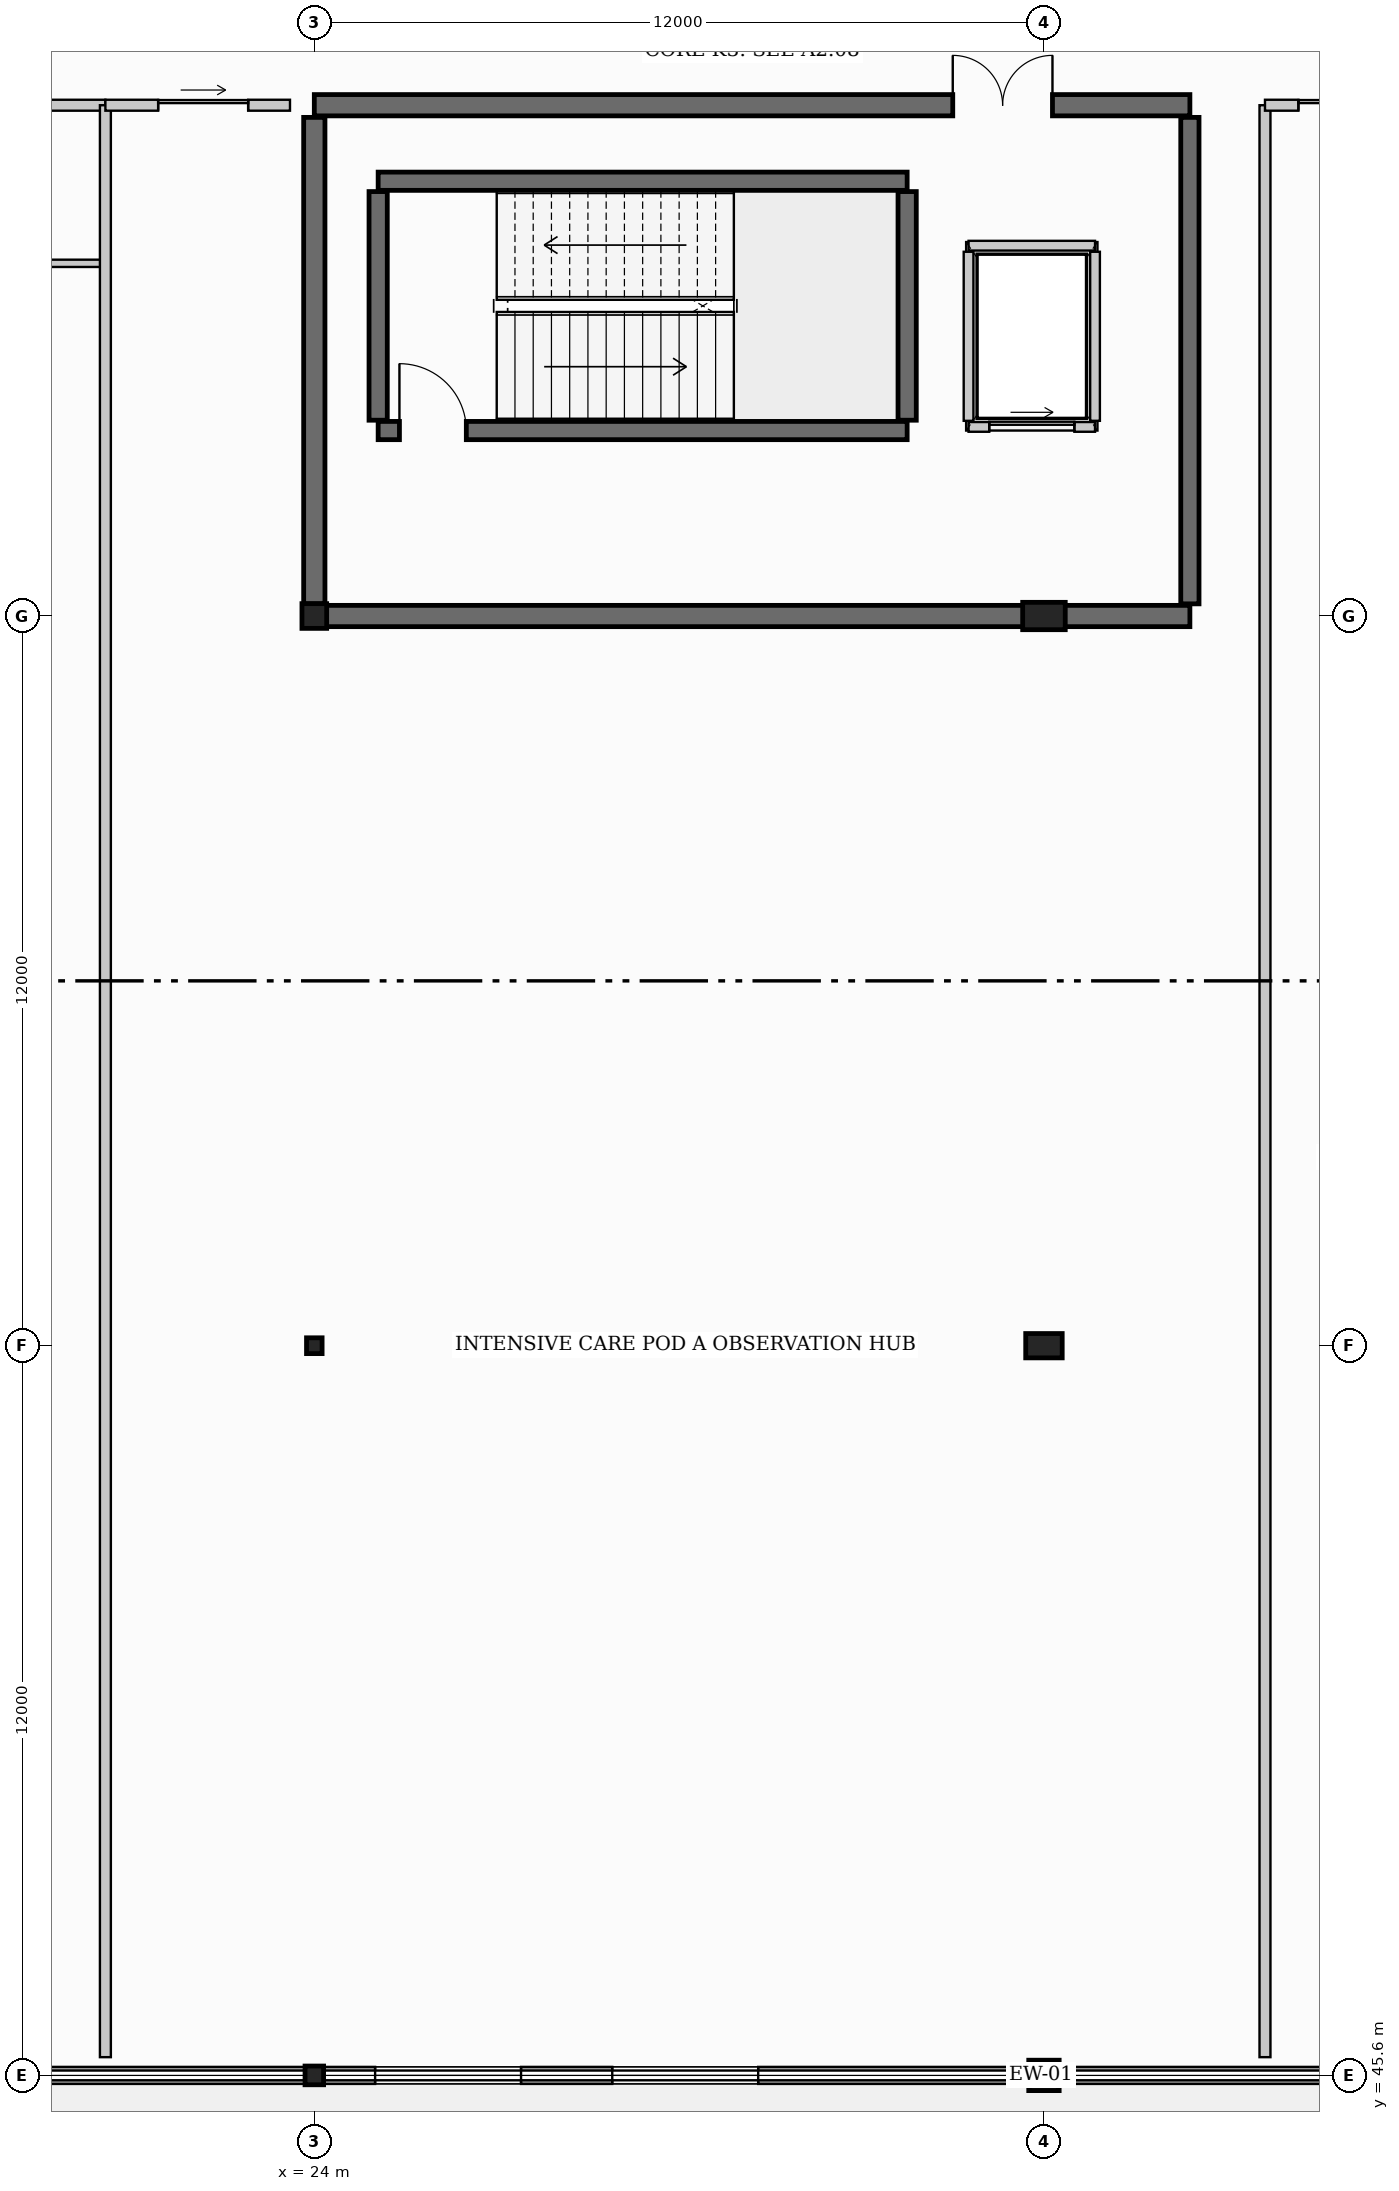
"""IFC4 building model, lengths in metres.
Left out: names, types, materials, properties, quantities, classifications, styles, units other than length and angle.
Written with IfcOpenShell. Run it as: python <this file> out.ifc"""

import sys

from ifc_helpers import new_model, si_unit, direction, frame, frame_2d, origin, origin_2d, place, context, subcontext, project, spatial, rectangle, hollow_circle, i_section, extrude, element, fill, save


model = new_model("IFC4")
c1 = context("Model", 3, precision=1e-05, world=origin(), true_north=direction((0.0, 1.0)))
c2 = subcontext(c1, "Body", "Model", "MODEL_VIEW")
j1 = project(units=[si_unit("LENGTHUNIT", "METRE"), si_unit("PLANEANGLEUNIT", "RADIAN")], contexts=[c1])
p1 = place(None, origin())
s1 = spatial("IfcSite", under=j1, at=p1, CompositionType="ELEMENT")
p2 = place(p1, origin())
s2 = spatial("IfcBuilding", under=s1, at=p2, CompositionType="ELEMENT")
p3 = place(p2, frame((0.0, 0.0, 4.8)))
s3 = spatial("IfcBuildingStorey", under=s2, at=p3, CompositionType="ELEMENT", Elevation=4.8)
p4 = place(p3, frame((24.0, 45.6, 0.0), z_axis=(0.0, 0.0, 1.0), x_axis=(1.0, 0.0, 0.0)))
e1 = element("IfcColumn", 1, at=p4, inside=s3, PredefinedType="COLUMN", context=c2, shape_type="SweptSolid", body=[
    extrude(i_section(OverallWidth=0.305, OverallDepth=0.308, WebThickness=0.01, FlangeThickness=0.015, at=origin_2d()), origin(), (0.0, 0.0, 1.0), 4.8),
])
p5 = place(p3, frame((24.0, 57.6, 0.0), z_axis=(0.0, 0.0, 1.0), x_axis=(1.0, 0.0, 0.0)))
e2 = element("IfcColumn", 2, at=p5, inside=s3, PredefinedType="COLUMN", context=c2, shape_type="SweptSolid", body=[
    extrude(i_section(OverallWidth=0.256, OverallDepth=0.26, WebThickness=0.01, FlangeThickness=0.017, at=origin_2d()), origin(), (0.0, 0.0, 1.0), 4.8),
])
p6 = place(p3, frame((24.0, 69.6, 0.0), z_axis=(0.0, 0.0, 1.0), x_axis=(1.0, 0.0, 0.0)))
e3 = element("IfcColumn", 3, at=p6, inside=s3, PredefinedType="COLUMN", context=c2, shape_type="SweptSolid", body=[
    extrude(hollow_circle(Radius=0.203, WallThickness=0.016, at=origin_2d()), origin(), (0.0, 0.0, 1.0), 4.8),
])
p7 = place(p3, frame((36.0, 45.6, 0.0), z_axis=(0.0, 0.0, 1.0), x_axis=(0.0, 1.0, 0.0)))
e4 = element("IfcColumn", 4, at=p7, inside=s3, PredefinedType="COLUMN", context=c2, shape_type="SweptSolid", body=[
    extrude(rectangle(XDim=0.5, YDim=0.5, at=origin_2d()), origin(), (0.0, 0.0, 1.0), 4.8),
])
p8 = place(p3, frame((36.0, 57.6, 0.0), z_axis=(0.0, 0.0, 1.0), x_axis=(0.0, 1.0, 0.0)))
e5 = element("IfcColumn", 5, at=p8, inside=s3, PredefinedType="PILASTER", context=c2, shape_type="SweptSolid", body=[
    extrude(rectangle(XDim=0.4, YDim=0.6, at=origin_2d()), origin(), (0.0, 0.0, 1.0), 4.8),
])
p9 = place(p3, frame((36.0, 69.6, 0.0), z_axis=(0.0, 0.0, 1.0), x_axis=(0.0, 1.0, 0.0)))
e6 = element("IfcColumn", 6, at=p9, inside=s3, PredefinedType="PILASTER", context=c2, shape_type="SweptSolid", body=[
    extrude(rectangle(XDim=0.45, YDim=0.7, at=origin_2d()), origin(), (0.0, 0.0, 1.0), 4.8),
])
p10 = place(p3, frame((24.0, 78.0, 0.0), z_axis=(0.0, 0.0, 1.0), x_axis=(1.0, 0.0, 0.0)))
e7 = element("IfcWall", 7, at=p10, inside=s3, PredefinedType="SHEAR", context=c2, shape_type="SweptSolid", body=[
    extrude(rectangle(XDim=14.4, YDim=0.35, at=frame_2d((7.2, 0.0))), origin(), (0.0, 0.0, 1.0), 4.8),
])
p11 = place(p10, frame((10.5, 0.0, 0.0)))
e8 = element("IfcOpeningElement", 8, at=p11, cuts=e7, PredefinedType="OPENING", context=c2, shape_type="SweptSolid", body=[
    extrude(rectangle(XDim=1.64, YDim=2.2, at=frame_2d((0.82, 1.1))), frame((0.0, 0.185, 0.0), z_axis=(0.0, -1.0, 0.0), x_axis=(1.0, 0.0, 0.0)), (0.0, 0.0, 1.0), 0.37),
])
p12 = place(p3, frame((38.4, 69.6, 0.0), z_axis=(0.0, 0.0, 1.0), x_axis=(-1.0, 0.0, 0.0)))
e9 = element("IfcWall", 9, at=p12, inside=s3, PredefinedType="SHEAR", context=c2, shape_type="SweptSolid", body=[
    extrude(rectangle(XDim=14.4, YDim=0.35, at=frame_2d((7.2, 0.0))), origin(), (0.0, 0.0, 1.0), 4.8),
])
p13 = place(p3, frame((24.0, 69.8, 0.0), z_axis=(0.0, 0.0, 1.0), x_axis=(0.0, 1.0, 0.0)))
e10 = element("IfcWall", 10, at=p13, inside=s3, PredefinedType="SHEAR", context=c2, shape_type="SweptSolid", body=[
    extrude(rectangle(XDim=8.0, YDim=0.35, at=frame_2d((4.0, 0.0))), origin(), (0.0, 0.0, 1.0), 4.8),
])
p14 = place(p3, frame((38.4, 77.8, 0.0), z_axis=(0.0, 0.0, 1.0), x_axis=(0.0, -1.0, 0.0)))
e11 = element("IfcWall", 11, at=p14, inside=s3, PredefinedType="SHEAR", context=c2, shape_type="SweptSolid", body=[
    extrude(rectangle(XDim=8.0, YDim=0.3, at=frame_2d((4.0, 0.0))), origin(), (0.0, 0.0, 1.0), 4.8),
])
p15 = place(p3, frame((25.05, 72.65, 0.0), z_axis=(0.0, 0.0, 1.0), x_axis=(1.0, 0.0, 0.0)))
e12 = element("IfcWall", 12, at=p15, inside=s3, PredefinedType="SHEAR", context=c2, shape_type="SweptSolid", body=[
    extrude(rectangle(XDim=8.7, YDim=0.3, at=frame_2d((4.35, 0.0))), origin(), (0.0, 0.0, 1.0), 4.8),
])
p16 = place(p15, frame((0.35, 0.0, 0.0)))
e13 = element("IfcOpeningElement", 13, at=p16, cuts=e12, PredefinedType="OPENING", context=c2, shape_type="SweptSolid", body=[
    extrude(rectangle(XDim=1.1, YDim=2.15, at=frame_2d((0.55, 1.075))), frame((0.0, 0.16, 0.0), z_axis=(0.0, -1.0, 0.0), x_axis=(1.0, 0.0, 0.0)), (0.0, 0.0, 1.0), 0.32),
])
p17 = place(p3, frame((33.75, 76.75, 0.0), z_axis=(0.0, 0.0, 1.0), x_axis=(-1.0, 0.0, 0.0)))
e14 = element("IfcWall", 14, at=p17, inside=s3, PredefinedType="SHEAR", context=c2, shape_type="SweptSolid", body=[
    extrude(rectangle(XDim=8.7, YDim=0.3, at=frame_2d((4.35, 0.0))), origin(), (0.0, 0.0, 1.0), 4.8),
])
for number, where, z_axis, x_axis in (
    (15, (25.05, 72.82, 0.0), (0.0, 0.0, 1.0), (0.0, 1.0, 0.0)),
    (16, (33.75, 72.82, 0.0), (0.0, 0.0, 1.0), (0.0, 1.0, 0.0)),
):
    element("IfcWall", number, at=place(p3, frame(where, z_axis=z_axis, x_axis=x_axis)), inside=s3, PredefinedType="SHEAR", context=c2, shape_type="SweptSolid", body=[
        extrude(rectangle(XDim=3.76, YDim=0.3, at=frame_2d((1.88, 0.0))), origin(), (0.0, 0.0, 1.0), 4.8),
    ])
p18 = place(p3, frame((48.0, 45.6, 0.0), z_axis=(0.0, 0.0, 1.0), x_axis=(-1.0, 0.0, 0.0)))
e17 = element("IfcWall", 17, at=p18, inside=s3, PredefinedType="STANDARD", context=c2, shape_type="SweptSolid", body=[
    extrude(rectangle(XDim=48.0, YDim=0.28, at=frame_2d((24.0, 0.0))), origin(), (0.0, 0.0, 1.0), 3.465),
])
p19 = place(p18, frame((1.1, 0.0, 0.95)))
e18 = element("IfcOpeningElement", 18, at=p19, cuts=e17, PredefinedType="OPENING", context=c2, shape_type="SweptSolid", body=[
    extrude(rectangle(XDim=2.4, YDim=1.5, at=frame_2d((1.2, 0.75))), frame((0.0, 0.15, 0.0), z_axis=(0.0, -1.0, 0.0), x_axis=(1.0, 0.0, 0.0)), (0.0, 0.0, 1.0), 0.3),
])
p20 = place(p18, frame((5.0, 0.0, 0.95)))
e19 = element("IfcOpeningElement", 19, at=p20, cuts=e17, PredefinedType="OPENING", context=c2, shape_type="SweptSolid", body=[
    extrude(rectangle(XDim=2.4, YDim=1.5, at=frame_2d((1.2, 0.75))), frame((0.0, 0.15, 0.0), z_axis=(0.0, -1.0, 0.0), x_axis=(1.0, 0.0, 0.0)), (0.0, 0.0, 1.0), 0.3),
])
p21 = place(p18, frame((16.7, 0.0, 0.95)))
e20 = element("IfcOpeningElement", 20, at=p21, cuts=e17, PredefinedType="OPENING", context=c2, shape_type="SweptSolid", body=[
    extrude(rectangle(XDim=2.4, YDim=1.5, at=frame_2d((1.2, 0.75))), frame((0.0, 0.15, 0.0), z_axis=(0.0, -1.0, 0.0), x_axis=(1.0, 0.0, 0.0)), (0.0, 0.0, 1.0), 0.3),
])
p22 = place(p18, frame((20.6, 0.0, 0.95)))
e21 = element("IfcOpeningElement", 21, at=p22, cuts=e17, PredefinedType="OPENING", context=c2, shape_type="SweptSolid", body=[
    extrude(rectangle(XDim=2.4, YDim=1.5, at=frame_2d((1.2, 0.75))), frame((0.0, 0.15, 0.0), z_axis=(0.0, -1.0, 0.0), x_axis=(1.0, 0.0, 0.0)), (0.0, 0.0, 1.0), 0.3),
])
p23 = place(p18, frame((28.4, 0.0, 0.95)))
e22 = element("IfcOpeningElement", 22, at=p23, cuts=e17, PredefinedType="OPENING", context=c2, shape_type="SweptSolid", body=[
    extrude(rectangle(XDim=2.4, YDim=1.5, at=frame_2d((1.2, 0.75))), frame((0.0, 0.15, 0.0), z_axis=(0.0, -1.0, 0.0), x_axis=(1.0, 0.0, 0.0)), (0.0, 0.0, 1.0), 0.3),
])
p24 = place(p18, frame((32.3, 0.0, 0.95)))
e23 = element("IfcOpeningElement", 23, at=p24, cuts=e17, PredefinedType="OPENING", context=c2, shape_type="SweptSolid", body=[
    extrude(rectangle(XDim=2.4, YDim=1.5, at=frame_2d((1.2, 0.75))), frame((0.0, 0.15, 0.0), z_axis=(0.0, -1.0, 0.0), x_axis=(1.0, 0.0, 0.0)), (0.0, 0.0, 1.0), 0.3),
])
p25 = place(p18, frame((40.1, 0.0, 0.95)))
e24 = element("IfcOpeningElement", 24, at=p25, cuts=e17, PredefinedType="OPENING", context=c2, shape_type="SweptSolid", body=[
    extrude(rectangle(XDim=2.4, YDim=1.5, at=frame_2d((1.2, 0.75))), frame((0.0, 0.15, 0.0), z_axis=(0.0, -1.0, 0.0), x_axis=(1.0, 0.0, 0.0)), (0.0, 0.0, 1.0), 0.3),
])
p26 = place(p18, frame((44.0, 0.0, 0.95)))
e25 = element("IfcOpeningElement", 25, at=p26, cuts=e17, PredefinedType="OPENING", context=c2, shape_type="SweptSolid", body=[
    extrude(rectangle(XDim=2.4, YDim=1.5, at=frame_2d((1.2, 0.75))), frame((0.0, 0.15, 0.0), z_axis=(0.0, -1.0, 0.0), x_axis=(1.0, 0.0, 0.0)), (0.0, 0.0, 1.0), 0.3),
])
p27 = place(p3, frame((34.76, 72.71, 0.0), z_axis=(0.0, 0.0, 1.0), x_axis=(1.0, 0.0, 0.0)))
e26 = element("IfcWall", 26, at=p27, inside=s3, PredefinedType="PARTITIONING", context=c2, shape_type="SweptSolid", body=[
    extrude(rectangle(XDim=2.08, YDim=0.16, at=frame_2d((1.04, 0.0))), origin(), (0.0, 0.0, 1.0), 4.43),
])
p28 = place(p27, frame((0.34, 0.0, 0.0)))
e27 = element("IfcOpeningElement", 27, at=p28, cuts=e26, PredefinedType="OPENING", context=c2, shape_type="SweptSolid", body=[
    extrude(rectangle(XDim=1.4, YDim=2.2, at=frame_2d((0.7, 1.1))), frame((0.0, 0.09, 0.0), z_axis=(0.0, -1.0, 0.0), x_axis=(1.0, 0.0, 0.0)), (0.0, 0.0, 1.0), 0.18),
])
p29 = place(p3, frame((36.84, 75.69, 0.0), z_axis=(0.0, 0.0, 1.0), x_axis=(-1.0, 0.0, 0.0)))
e28 = element("IfcWall", 28, at=p29, inside=s3, PredefinedType="PARTITIONING", context=c2, shape_type="SweptSolid", body=[
    extrude(rectangle(XDim=2.08, YDim=0.16, at=frame_2d((1.04, 0.0))), origin(), (0.0, 0.0, 1.0), 4.43),
])
for number, where, z_axis, x_axis in (
    (29, (34.76, 75.59, 0.0), (0.0, 0.0, 1.0), (0.0, -1.0, 0.0)),
    (30, (36.84, 72.81, 0.0), (0.0, 0.0, 1.0), (0.0, 1.0, 0.0)),
):
    element("IfcWall", number, at=place(p3, frame(where, z_axis=z_axis, x_axis=x_axis)), inside=s3, PredefinedType="PARTITIONING", context=c2, shape_type="SweptSolid", body=[
        extrude(rectangle(XDim=2.78, YDim=0.16, at=frame_2d((1.39, 0.0))), origin(), (0.0, 0.0, 1.0), 4.43),
    ])
p30 = place(p3, frame((18.364, 75.4, 0.0), z_axis=(0.0, 0.0, 1.0), x_axis=(1.0, 0.0, 0.0)))
e31 = element("IfcWall", 31, at=p30, inside=s3, PredefinedType="PARTITIONING", context=c2, shape_type="SweptSolid", body=[
    extrude(rectangle(XDim=2.2, YDim=0.12, at=frame_2d((1.1, 0.0))), origin(), (0.0, 0.0, 1.0), 4.43),
])
p31 = place(p3, frame((10.432, 78.0, 0.0), z_axis=(0.0, 0.0, 1.0), x_axis=(1.0, 0.0, 0.0)))
e32 = element("IfcWall", 32, at=p31, inside=s3, PredefinedType="PARTITIONING", context=c2, shape_type="SweptSolid", body=[
    extrude(rectangle(XDim=10.132, YDim=0.18, at=frame_2d((5.066, 0.0))), origin(), (0.0, 0.0, 1.0), 3.465),
])
p32 = place(p31, frame((0.55, 0.0, 0.0)))
e33 = element("IfcOpeningElement", 33, at=p32, cuts=e32, PredefinedType="OPENING", context=c2, shape_type="SweptSolid", body=[
    extrude(rectangle(XDim=1.48, YDim=2.26, at=frame_2d((0.74, 1.13))), frame((0.0, 0.1, 0.0), z_axis=(0.0, -1.0, 0.0), x_axis=(1.0, 0.0, 0.0)), (0.0, 0.0, 1.0), 0.2),
])
p33 = place(p3, frame((20.564, 45.9, 0.0), z_axis=(0.0, 0.0, 1.0), x_axis=(0.0, 1.0, 0.0)))
e34 = element("IfcWall", 34, at=p33, inside=s3, PredefinedType="PARTITIONING", context=c2, shape_type="SweptSolid", body=[
    extrude(rectangle(XDim=32.1, YDim=0.18, at=frame_2d((16.05, 0.0))), origin(), (0.0, 0.0, 1.0), 3.887),
])
p34 = place(p3, frame((20.564, 78.0, 0.0), z_axis=(0.0, 0.0, 1.0), x_axis=(1.0, 0.0, 0.0)))
e35 = element("IfcWall", 35, at=p34, inside=s3, PredefinedType="PARTITIONING", context=c2, shape_type="SweptSolid", body=[
    extrude(rectangle(XDim=3.036, YDim=0.18, at=frame_2d((1.518, 0.0))), origin(), (0.0, 0.0, 1.0), 4.43),
])
p35 = place(p34, frame((0.868, 0.0, 0.0)))
e36 = element("IfcOpeningElement", 36, at=p35, cuts=e35, PredefinedType="OPENING", context=c2, shape_type="SweptSolid", body=[
    extrude(rectangle(XDim=1.48, YDim=2.26, at=frame_2d((0.74, 1.13))), frame((0.0, 0.1, 0.0), z_axis=(0.0, -1.0, 0.0), x_axis=(1.0, 0.0, 0.0)), (0.0, 0.0, 1.0), 0.2),
])
p36 = place(p3, frame((39.635, 45.9, 0.0), z_axis=(0.0, 0.0, 1.0), x_axis=(0.0, 1.0, 0.0)))
e37 = element("IfcWall", 37, at=p36, inside=s3, PredefinedType="PARTITIONING", context=c2, shape_type="SweptSolid", body=[
    extrude(rectangle(XDim=32.1, YDim=0.18, at=frame_2d((16.05, 0.0))), origin(), (0.0, 0.0, 1.0), 3.958),
])
p37 = place(p3, frame((39.635, 78.0, 0.0), z_axis=(0.0, 0.0, 1.0), x_axis=(1.0, 0.0, 0.0)))
e38 = element("IfcWall", 38, at=p37, inside=s3, PredefinedType="PARTITIONING", context=c2, shape_type="SweptSolid", body=[
    extrude(rectangle(XDim=7.152, YDim=0.18, at=frame_2d((3.576, 0.0))), origin(), (0.0, 0.0, 1.0), 4.43),
])
p38 = place(p37, frame((0.55, 0.0, 0.0)))
e39 = element("IfcOpeningElement", 39, at=p38, cuts=e38, PredefinedType="OPENING", context=c2, shape_type="SweptSolid", body=[
    extrude(rectangle(XDim=1.48, YDim=2.26, at=frame_2d((0.74, 1.13))), frame((0.0, 0.1, 0.0), z_axis=(0.0, -1.0, 0.0), x_axis=(1.0, 0.0, 0.0)), (0.0, 0.0, 1.0), 0.2),
])
p39 = place(p21, origin())
e40 = element("IfcWindow", 40, at=p39, inside=s3, PartitioningType="TRIPLE_PANEL_VERTICAL", PredefinedType="WINDOW", context=c2, shape_type="SweptSolid", body=[
    extrude(rectangle(XDim=2.4, YDim=1.5, at=frame_2d((1.2, 0.75))), frame((0.0, 0.03, 0.0), z_axis=(0.0, -1.0, 0.0), x_axis=(1.0, 0.0, 0.0)), (0.0, 0.0, 1.0), 0.06),
])
fill(e20, e40)
p40 = place(p22, origin())
e41 = element("IfcWindow", 41, at=p40, inside=s3, PartitioningType="TRIPLE_PANEL_VERTICAL", PredefinedType="WINDOW", context=c2, shape_type="SweptSolid", body=[
    extrude(rectangle(XDim=2.4, YDim=1.5, at=frame_2d((1.2, 0.75))), frame((0.0, 0.03, 0.0), z_axis=(0.0, -1.0, 0.0), x_axis=(1.0, 0.0, 0.0)), (0.0, 0.0, 1.0), 0.06),
])
fill(e21, e41)
p41 = place(p28, origin())
e42 = element("IfcDoor", 42, at=p41, inside=s3, OperationType="SLIDING_TO_LEFT", PredefinedType="DOOR", context=c2, shape_type="SweptSolid", body=[
    extrude(rectangle(XDim=1.4, YDim=2.2, at=frame_2d((0.7, 1.1))), frame((0.0, 0.025, 0.0), z_axis=(0.0, -1.0, 0.0), x_axis=(1.0, 0.0, 0.0)), (0.0, 0.0, 1.0), 0.05),
])
fill(e27, e42)
p42 = place(p16, origin())
e43 = element("IfcDoor", 43, at=p42, inside=s3, OperationType="SINGLE_SWING_LEFT", PredefinedType="DOOR", context=c2, shape_type="SweptSolid", body=[
    extrude(rectangle(XDim=1.1, YDim=2.15, at=frame_2d((0.55, 1.075))), frame((0.0, 0.025, 0.0), z_axis=(0.0, -1.0, 0.0), x_axis=(1.0, 0.0, 0.0)), (0.0, 0.0, 1.0), 0.05),
])
fill(e13, e43)
p43 = place(p11, origin())
e44 = element("IfcDoor", 44, at=p43, inside=s3, OperationType="DOUBLE_DOOR_SINGLE_SWING", PredefinedType="DOOR", context=c2, shape_type="SweptSolid", body=[
    extrude(rectangle(XDim=1.64, YDim=2.2, at=frame_2d((0.82, 1.1))), frame((0.0, 0.025, 0.0), z_axis=(0.0, -1.0, 0.0), x_axis=(1.0, 0.0, 0.0)), (0.0, 0.0, 1.0), 0.05),
])
fill(e8, e44)
p44 = place(p35, origin())
e45 = element("IfcDoor", 45, at=p44, inside=s3, OperationType="SLIDING_TO_LEFT", PredefinedType="DOOR", context=c2, shape_type="SweptSolid", body=[
    extrude(rectangle(XDim=1.48, YDim=2.26, at=frame_2d((0.74, 1.13))), frame((0.0, 0.025, 0.0), z_axis=(0.0, -1.0, 0.0), x_axis=(1.0, 0.0, 0.0)), (0.0, 0.0, 1.0), 0.05),
])
fill(e36, e45)
p45 = place(p38, origin())
e46 = element("IfcDoor", 46, at=p45, inside=s3, OperationType="SLIDING_TO_LEFT", PredefinedType="DOOR", context=c2, shape_type="SweptSolid", body=[
    extrude(rectangle(XDim=1.48, YDim=2.26, at=frame_2d((0.74, 1.13))), frame((0.0, 0.025, 0.0), z_axis=(0.0, -1.0, 0.0), x_axis=(1.0, 0.0, 0.0)), (0.0, 0.0, 1.0), 0.05),
])
fill(e39, e46)
save(model, sys.argv[1])
